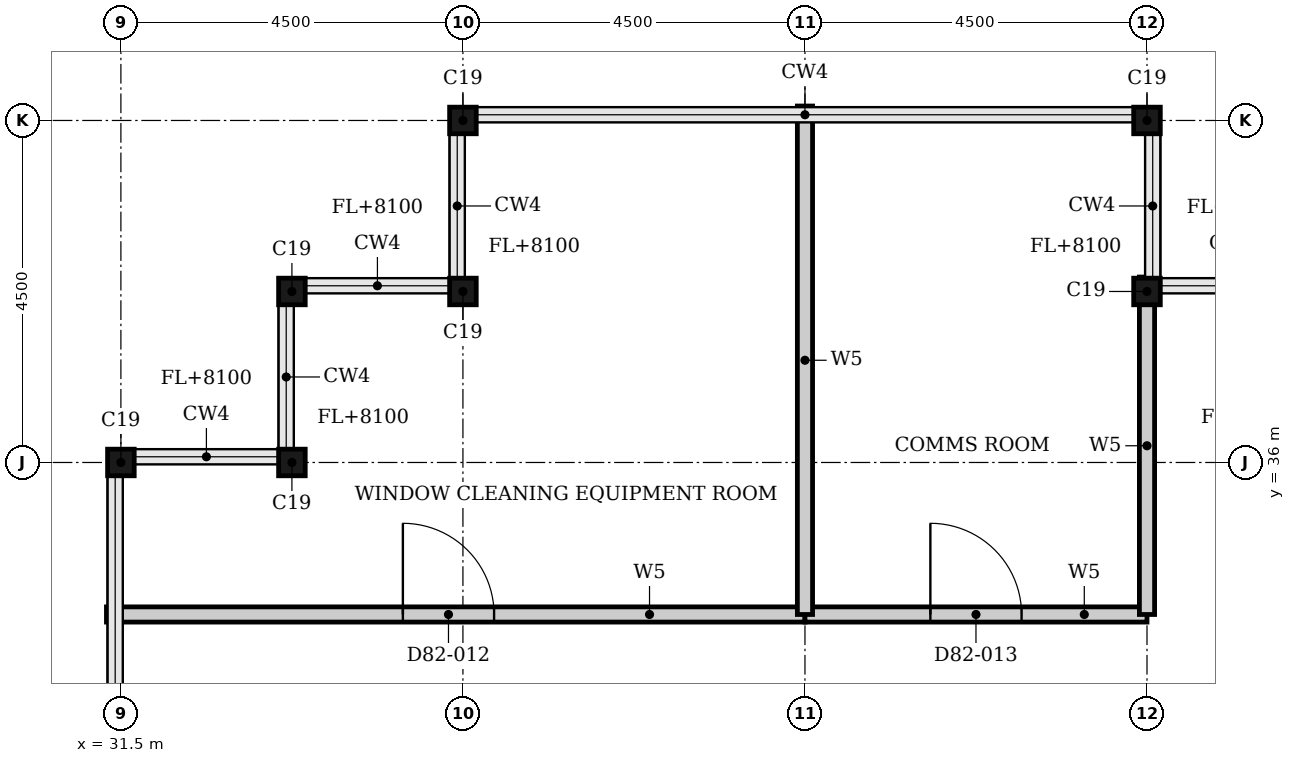
"""IFC4 building model, lengths in metres.
Left out: names, types, materials, properties, quantities, classifications, styles, units other than length and angle.
Written with IfcOpenShell. Run it as: python <this file> out.ifc"""

import sys

from ifc_helpers import new_model, si_unit, direction, frame, frame_2d, origin, origin_2d, place, context, subcontext, project, spatial, rectangle, i_section, extrude, element, fill, save


model = new_model("IFC4")
c1 = context("Model", 3, precision=1e-05, world=origin(), true_north=direction((0.0, 1.0)))
c2 = subcontext(c1, "Body", "Model", "MODEL_VIEW")
j1 = project(units=[si_unit("LENGTHUNIT", "METRE"), si_unit("PLANEANGLEUNIT", "RADIAN")], contexts=[c1])
p1 = place(None, origin())
s1 = spatial("IfcSite", under=j1, at=p1, CompositionType="ELEMENT")
p2 = place(p1, origin())
s2 = spatial("IfcBuilding", under=s1, at=p2, CompositionType="ELEMENT")
p3 = place(p2, frame((0.0, 0.0, 325.4)))
s3 = spatial("IfcBuildingStorey", under=s2, at=p3, CompositionType="ELEMENT", Elevation=325.4)
for number, where, z_axis, x_axis in (
    (1, (45.0, 38.25, 0.0), (0.0, 0.0, 1.0), (1.0, 0.0, 0.0)),
    (2, (45.0, 40.5, 0.0), (0.0, 0.0, 1.0), (1.0, 0.0, 0.0)),
    (3, (36.0, 40.5, 0.0), (0.0, 0.0, 1.0), (1.0, 0.0, 0.0)),
    (4, (36.0, 38.25, 0.0), (0.0, 0.0, 1.0), (1.0, 0.0, 0.0)),
    (5, (33.75, 38.25, 0.0), (0.0, 0.0, 1.0), (1.0, 0.0, 0.0)),
    (6, (33.75, 36.0, 0.0), (0.0, 0.0, 1.0), (1.0, 0.0, 0.0)),
    (7, (31.5, 36.0, 0.0), (0.0, 0.0, 1.0), (1.0, 0.0, 0.0)),
):
    element("IfcColumn", number, at=place(p3, frame(where, z_axis=z_axis, x_axis=x_axis)), inside=s3, PredefinedType="COLUMN", context=c2, shape_type="SweptSolid", body=[
        extrude(i_section(OverallWidth=0.35, OverallDepth=0.35, WebThickness=0.012, FlangeThickness=0.019, FilletRadius=0.013, at=origin_2d()), origin(), (0.0, 0.0, 1.0), 4.2),
    ])
p4 = place(p3, frame((31.31, 34.0, 0.0), z_axis=(0.0, 0.0, 1.0), x_axis=(1.0, 0.0, 0.0)))
e8 = element("IfcWall", 8, at=p4, inside=s3, PredefinedType="PARTITIONING", context=c2, shape_type="SweptSolid", body=[
    extrude(rectangle(XDim=9.19, YDim=0.2, at=frame_2d((4.595, 0.0))), origin(), (0.0, 0.0, 1.0), 3.9),
])
p5 = place(p4, frame((3.9, 0.0, 0.0)))
e9 = element("IfcOpeningElement", 9, at=p5, cuts=e8, PredefinedType="OPENING", context=c2, shape_type="SweptSolid", body=[
    extrude(rectangle(XDim=1.2, YDim=2.1, at=frame_2d((0.6, 1.05))), frame((0.0, 0.11, 0.0), z_axis=(0.0, -1.0, 0.0), x_axis=(1.0, 0.0, 0.0)), (0.0, 0.0, 1.0), 0.22),
])
p6 = place(p3, frame((40.5, 34.0, 0.0), z_axis=(0.0, 0.0, 1.0), x_axis=(1.0, 0.0, 0.0)))
e10 = element("IfcWall", 10, at=p6, inside=s3, PredefinedType="PARTITIONING", context=c2, shape_type="SweptSolid", body=[
    extrude(rectangle(XDim=4.5, YDim=0.2, at=frame_2d((2.25, 0.0))), origin(), (0.0, 0.0, 1.0), 3.9),
])
p7 = place(p6, frame((1.65, 0.0, 0.0)))
e11 = element("IfcOpeningElement", 11, at=p7, cuts=e10, PredefinedType="OPENING", context=c2, shape_type="SweptSolid", body=[
    extrude(rectangle(XDim=1.2, YDim=2.1, at=frame_2d((0.6, 1.05))), frame((0.0, 0.11, 0.0), z_axis=(0.0, -1.0, 0.0), x_axis=(1.0, 0.0, 0.0)), (0.0, 0.0, 1.0), 0.22),
])
p8 = place(p3, frame((40.5, 34.0, 0.0), z_axis=(0.0, 0.0, 1.0), x_axis=(0.0, 1.0, 0.0)))
e12 = element("IfcWall", 12, at=p8, inside=s3, PredefinedType="PARTITIONING", context=c2, shape_type="SweptSolid", body=[
    extrude(rectangle(XDim=6.69, YDim=0.2, at=frame_2d((3.345, 0.0))), origin(), (0.0, 0.0, 1.0), 3.9),
])
p9 = place(p3, frame((45.0, 34.0, 0.0), z_axis=(0.0, 0.0, 1.0), x_axis=(0.0, 1.0, 0.0)))
e13 = element("IfcWall", 13, at=p9, inside=s3, PredefinedType="PARTITIONING", context=c2, shape_type="SweptSolid", body=[
    extrude(rectangle(XDim=4.44, YDim=0.2, at=frame_2d((2.22, 0.0))), origin(), (0.0, 0.0, 1.0), 3.9),
])
p10 = place(p5, origin())
e14 = element("IfcDoor", 14, at=p10, inside=s3, OperationType="SINGLE_SWING_LEFT", PredefinedType="DOOR", context=c2, shape_type="SweptSolid", body=[
    extrude(rectangle(XDim=1.2, YDim=2.1, at=frame_2d((0.6, 1.05))), frame((0.0, 0.025, 0.0), z_axis=(0.0, -1.0, 0.0), x_axis=(1.0, 0.0, 0.0)), (0.0, 0.0, 1.0), 0.05),
])
fill(e9, e14)
p11 = place(p7, origin())
e15 = element("IfcDoor", 15, at=p11, inside=s3, OperationType="SINGLE_SWING_RIGHT", PredefinedType="DOOR", context=c2, shape_type="SweptSolid", body=[
    extrude(rectangle(XDim=1.2, YDim=2.1, at=frame_2d((0.6, 1.05))), frame((0.0, 0.025, 0.0), z_axis=(0.0, -1.0, 0.0), x_axis=(1.0, 0.0, 0.0)), (0.0, 0.0, 1.0), 0.05),
])
fill(e11, e15)
save(model, sys.argv[1])
